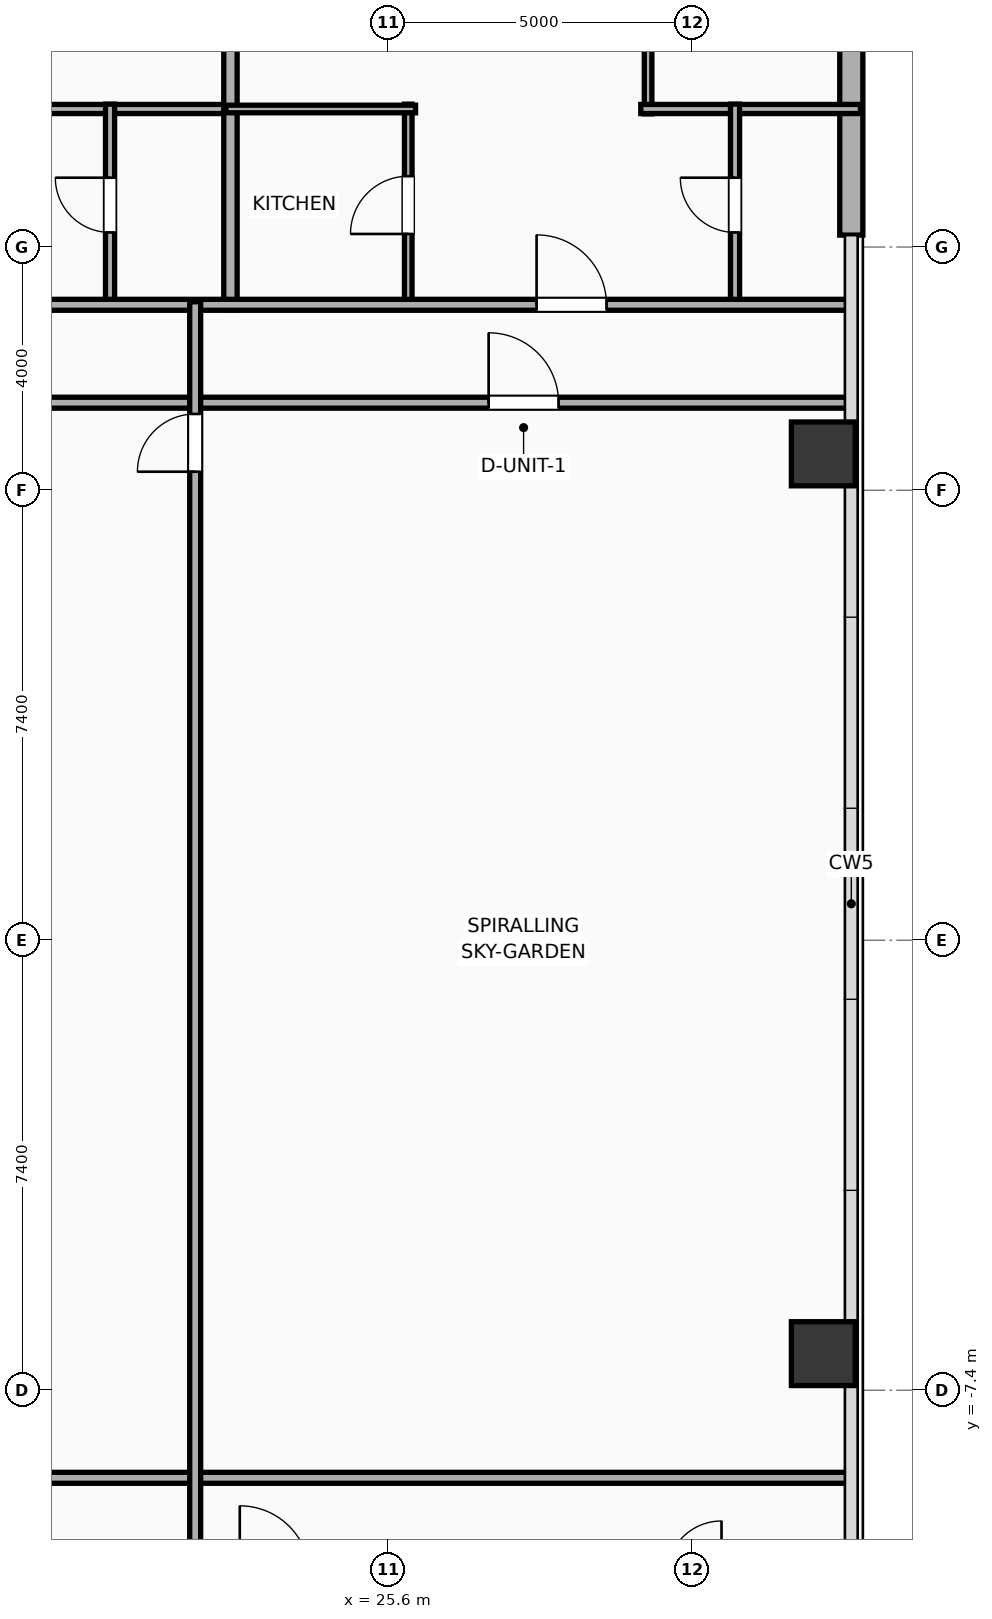
"""IFC4 building model, lengths in metres.
Left out: names, types, materials, properties, quantities, classifications, styles, units other than length and angle.
Written with IfcOpenShell. Run it as: python <this file> out.ifc"""

import sys

from ifc_helpers import new_model, si_unit, direction, frame, frame_2d, origin, origin_2d, place, context, subcontext, project, spatial, rectangle, hollow_rectangle, extrude, element, fill, save


model = new_model("IFC4")
c1 = context("Model", 3, precision=1e-05, world=origin(), true_north=direction((0.0, 1.0)))
c2 = subcontext(c1, "Body", "Model", "MODEL_VIEW")
j1 = project(units=[si_unit("LENGTHUNIT", "METRE"), si_unit("PLANEANGLEUNIT", "RADIAN")], contexts=[c1])
p1 = place(None, origin())
s1 = spatial("IfcSite", under=j1, at=p1, CompositionType="ELEMENT")
p2 = place(p1, origin())
s2 = spatial("IfcBuilding", under=s1, at=p2, CompositionType="ELEMENT")
p3 = place(p2, frame((0.0, 0.0, 93.6)))
s3 = spatial("IfcBuildingStorey", under=s2, at=p3, CompositionType="ELEMENT", Elevation=93.6)
for number, where, z_axis, x_axis in (
    (1, (32.75, -6.798, 0.0), (0.0, 0.0, 1.0), (1.0, 0.0, 0.0)),
    (2, (32.75, 7.998, 0.0), (0.0, 0.0, 1.0), (1.0, 0.0, 0.0)),
):
    element("IfcColumn", number, at=place(p3, frame(where, z_axis=z_axis, x_axis=x_axis)), inside=s3, PredefinedType="COLUMN", context=c2, shape_type="SweptSolid", body=[
        extrude(hollow_rectangle(XDim=1.05, YDim=1.05, WallThickness=0.036, at=origin_2d()), origin(), (0.0, 0.0, 1.0), 3.9),
    ])
p4 = place(p3, frame((33.21, 17.781, 0.0), z_axis=(0.0, 0.0, 1.0), x_axis=(0.0, -1.0, 0.0)))
e3 = element("IfcWall", 3, at=p4, inside=s3, PredefinedType="ELEMENTEDWALL", context=c2, shape_type="SweptSolid", body=[
    extrude(rectangle(XDim=6.185, YDim=0.38, at=frame_2d((3.093, 0.0))), origin(), (0.0, 0.0, 1.0), 3.65),
])
p5 = place(p3, frame((9.88, 8.84, 0.0), z_axis=(0.0, 0.0, 1.0), x_axis=(1.0, 0.0, 0.0)))
e4 = element("IfcWall", 4, at=p5, inside=s3, PredefinedType="PARTITIONING", context=c2, shape_type="SweptSolid", body=[
    extrude(rectangle(XDim=23.33, YDim=0.18, at=frame_2d((11.665, 0.0))), origin(), (0.0, 0.0, 1.0), 3.65),
])
p6 = place(p5, frame((17.366, 0.0, 0.0)))
e5 = element("IfcOpeningElement", 5, at=p6, cuts=e4, PredefinedType="OPENING", context=c2, shape_type="SweptSolid", body=[
    extrude(rectangle(XDim=1.15, YDim=2.05, at=frame_2d((0.575, 1.025))), frame((0.0, 0.1, 0.0), z_axis=(0.0, -1.0, 0.0), x_axis=(1.0, 0.0, 0.0)), (0.0, 0.0, 1.0), 0.2),
])
p7 = place(p3, frame((9.88, -8.84, 0.0), z_axis=(0.0, 0.0, 1.0), x_axis=(1.0, 0.0, 0.0)))
e6 = element("IfcWall", 6, at=p7, inside=s3, PredefinedType="PARTITIONING", context=c2, shape_type="SweptSolid", body=[
    extrude(rectangle(XDim=23.33, YDim=0.18, at=frame_2d((11.665, 0.0))), origin(), (0.0, 0.0, 1.0), 3.65),
])
p8 = place(p3, frame((19.47, 13.67, 0.0), z_axis=(0.0, 0.0, 1.0), x_axis=(1.0, 0.0, 0.0)))
e7 = element("IfcWall", 7, at=p8, inside=s3, PredefinedType="PLUMBINGWALL", context=c2, shape_type="SweptSolid", body=[
    extrude(rectangle(XDim=3.605, YDim=0.15, at=frame_2d((1.802, 0.0))), origin(), (0.0, 0.0, 1.0), 3.65),
])
p9 = place(p3, frame((21.02, 10.43, 0.0), z_axis=(0.0, 0.0, 1.0), x_axis=(0.0, 1.0, 0.0)))
e8 = element("IfcWall", 8, at=p9, inside=s3, PredefinedType="PLUMBINGWALL", context=c2, shape_type="SweptSolid", body=[
    extrude(rectangle(XDim=3.32, YDim=0.15, at=frame_2d((1.66, 0.0))), origin(), (0.0, 0.0, 1.0), 3.65),
])
p10 = place(p9, frame((1.21, 0.0, 0.0)))
e9 = element("IfcOpeningElement", 9, at=p10, cuts=e8, PredefinedType="OPENING", context=c2, shape_type="SweptSolid", body=[
    extrude(rectangle(XDim=0.9, YDim=2.05, at=frame_2d((0.45, 1.025))), frame((0.0, 0.085, 0.0), z_axis=(0.0, -1.0, 0.0), x_axis=(1.0, 0.0, 0.0)), (0.0, 0.0, 1.0), 0.17),
])
p11 = place(p3, frame((23.0, 10.37, 0.0), z_axis=(0.0, 0.0, 1.0), x_axis=(0.0, 1.0, 0.0)))
e10 = element("IfcWall", 10, at=p11, inside=s3, PredefinedType="PARTITIONING", context=c2, shape_type="SweptSolid", body=[
    extrude(rectangle(XDim=11.24, YDim=0.22, at=frame_2d((5.62, 0.0))), origin(), (0.0, 0.0, 1.0), 3.65),
])
p12 = place(p3, frame((29.868, 13.59, 0.0), z_axis=(0.0, 0.0, 1.0), x_axis=(0.0, 1.0, 0.0)))
e11 = element("IfcWall", 11, at=p12, inside=s3, PredefinedType="PARTITIONING", context=c2, shape_type="SweptSolid", body=[
    extrude(rectangle(XDim=8.076, YDim=0.125, at=frame_2d((4.038, 0.0))), origin(), (0.0, 0.0, 1.0), 3.65),
])
p13 = place(p12, frame((1.488, 0.0, 0.0)))
e12 = element("IfcOpeningElement", 12, at=p13, cuts=e11, PredefinedType="OPENING", context=c2, shape_type="SweptSolid", body=[
    extrude(rectangle(XDim=0.9, YDim=2.05, at=frame_2d((0.45, 1.025))), frame((0.0, 0.073, 0.0), z_axis=(0.0, -1.0, 0.0), x_axis=(1.0, 0.0, 0.0)), (0.0, 0.0, 1.0), 0.145),
])
p14 = place(p3, frame((29.748, 13.67, 0.0), z_axis=(0.0, 0.0, 1.0), x_axis=(1.0, 0.0, 0.0)))
e13 = element("IfcWall", 13, at=p14, inside=s3, PredefinedType="PLUMBINGWALL", context=c2, shape_type="SweptSolid", body=[
    extrude(rectangle(XDim=3.612, YDim=0.15, at=frame_2d((1.806, 0.0))), origin(), (0.0, 0.0, 1.0), 3.65),
])
p15 = place(p3, frame((25.924, 10.43, 0.0), z_axis=(0.0, 0.0, 1.0), x_axis=(0.0, 1.0, 0.0)))
e14 = element("IfcWall", 14, at=p15, inside=s3, PredefinedType="PARTITIONING", context=c2, shape_type="SweptSolid", body=[
    extrude(rectangle(XDim=3.32, YDim=0.125, at=frame_2d((1.66, 0.0))), origin(), (0.0, 0.0, 1.0), 3.65),
])
p16 = place(p15, frame((1.185, 0.0, 0.0)))
e15 = element("IfcOpeningElement", 15, at=p16, cuts=e14, PredefinedType="OPENING", context=c2, shape_type="SweptSolid", body=[
    extrude(rectangle(XDim=0.95, YDim=2.05, at=frame_2d((0.475, 1.025))), frame((0.0, 0.073, 0.0), z_axis=(0.0, -1.0, 0.0), x_axis=(1.0, 0.0, 0.0)), (0.0, 0.0, 1.0), 0.145),
])
p17 = place(p3, frame((22.925, 13.67, 0.0), z_axis=(0.0, 0.0, 1.0), x_axis=(1.0, 0.0, 0.0)))
e16 = element("IfcWall", 16, at=p17, inside=s3, PredefinedType="PARTITIONING", context=c2, shape_type="SweptSolid", body=[
    extrude(rectangle(XDim=3.119, YDim=0.125, at=frame_2d((1.56, 0.0))), origin(), (0.0, 0.0, 1.0), 3.65),
])
p18 = place(p3, frame((31.298, 10.43, 0.0), z_axis=(0.0, 0.0, 1.0), x_axis=(0.0, 1.0, 0.0)))
e17 = element("IfcWall", 17, at=p18, inside=s3, PredefinedType="PLUMBINGWALL", context=c2, shape_type="SweptSolid", body=[
    extrude(rectangle(XDim=3.32, YDim=0.15, at=frame_2d((1.66, 0.0))), origin(), (0.0, 0.0, 1.0), 3.65),
])
p19 = place(p18, frame((1.21, 0.0, 0.0)))
e18 = element("IfcOpeningElement", 18, at=p19, cuts=e17, PredefinedType="OPENING", context=c2, shape_type="SweptSolid", body=[
    extrude(rectangle(XDim=0.9, YDim=2.05, at=frame_2d((0.45, 1.025))), frame((0.0, 0.085, 0.0), z_axis=(0.0, -1.0, 0.0), x_axis=(1.0, 0.0, 0.0)), (0.0, 0.0, 1.0), 0.17),
])
p20 = place(p3, frame((-29.21, 10.45, 0.0), z_axis=(0.0, 0.0, 1.0), x_axis=(1.0, 0.0, 0.0)))
e19 = element("IfcWall", 19, at=p20, inside=s3, PredefinedType="PARTITIONING", context=c2, shape_type="SweptSolid", body=[
    extrude(rectangle(XDim=62.42, YDim=0.18, at=frame_2d((31.21, 0.0))), origin(), (0.0, 0.0, 1.0), 3.65),
])
p21 = place(p20, frame((2.534, 0.0, 0.0)))
e20 = element("IfcOpeningElement", 20, at=p21, cuts=e19, PredefinedType="OPENING", context=c2, shape_type="SweptSolid", body=[
    extrude(rectangle(XDim=0.9, YDim=2.05, at=frame_2d((0.45, 1.025))), frame((0.0, 0.1, 0.0), z_axis=(0.0, -1.0, 0.0), x_axis=(1.0, 0.0, 0.0)), (0.0, 0.0, 1.0), 0.2),
])
p22 = place(p20, frame((9.056, 0.0, 0.0)))
e21 = element("IfcOpeningElement", 21, at=p22, cuts=e19, PredefinedType="OPENING", context=c2, shape_type="SweptSolid", body=[
    extrude(rectangle(XDim=1.15, YDim=2.05, at=frame_2d((0.575, 1.025))), frame((0.0, 0.1, 0.0), z_axis=(0.0, -1.0, 0.0), x_axis=(1.0, 0.0, 0.0)), (0.0, 0.0, 1.0), 0.2),
])
p23 = place(p20, frame((16.303, 0.0, 0.0)))
e22 = element("IfcOpeningElement", 22, at=p23, cuts=e19, PredefinedType="OPENING", context=c2, shape_type="SweptSolid", body=[
    extrude(rectangle(XDim=1.15, YDim=2.05, at=frame_2d((0.575, 1.025))), frame((0.0, 0.1, 0.0), z_axis=(0.0, -1.0, 0.0), x_axis=(1.0, 0.0, 0.0)), (0.0, 0.0, 1.0), 0.2),
])
p24 = place(p20, frame((26.565, 0.0, 0.0)))
e23 = element("IfcOpeningElement", 23, at=p24, cuts=e19, PredefinedType="OPENING", context=c2, shape_type="SweptSolid", body=[
    extrude(rectangle(XDim=1.15, YDim=2.05, at=frame_2d((0.575, 1.025))), frame((0.0, 0.1, 0.0), z_axis=(0.0, -1.0, 0.0), x_axis=(1.0, 0.0, 0.0)), (0.0, 0.0, 1.0), 0.2),
])
p25 = place(p20, frame((36.677, 0.0, 0.0)))
e24 = element("IfcOpeningElement", 24, at=p25, cuts=e19, PredefinedType="OPENING", context=c2, shape_type="SweptSolid", body=[
    extrude(rectangle(XDim=1.15, YDim=2.05, at=frame_2d((0.575, 1.025))), frame((0.0, 0.1, 0.0), z_axis=(0.0, -1.0, 0.0), x_axis=(1.0, 0.0, 0.0)), (0.0, 0.0, 1.0), 0.2),
])
p26 = place(p20, frame((46.939, 0.0, 0.0)))
e25 = element("IfcOpeningElement", 25, at=p26, cuts=e19, PredefinedType="OPENING", context=c2, shape_type="SweptSolid", body=[
    extrude(rectangle(XDim=1.15, YDim=2.05, at=frame_2d((0.575, 1.025))), frame((0.0, 0.1, 0.0), z_axis=(0.0, -1.0, 0.0), x_axis=(1.0, 0.0, 0.0)), (0.0, 0.0, 1.0), 0.2),
])
p27 = place(p20, frame((57.245, 0.0, 0.0)))
e26 = element("IfcOpeningElement", 26, at=p27, cuts=e19, PredefinedType="OPENING", context=c2, shape_type="SweptSolid", body=[
    extrude(rectangle(XDim=1.15, YDim=2.05, at=frame_2d((0.575, 1.025))), frame((0.0, 0.1, 0.0), z_axis=(0.0, -1.0, 0.0), x_axis=(1.0, 0.0, 0.0)), (0.0, 0.0, 1.0), 0.2),
])
p28 = place(p3, frame((22.42, -10.5, 0.0), z_axis=(0.0, 0.0, 1.0), x_axis=(0.0, 1.0, 0.0)))
e27 = element("IfcWall", 27, at=p28, inside=s3, PredefinedType="PARTITIONING", context=c2, shape_type="SweptSolid", body=[
    extrude(rectangle(XDim=21.0, YDim=0.18, at=frame_2d((10.5, 0.0))), origin(), (0.0, 0.0, 1.0), 3.65),
])
p29 = place(p28, frame((18.205, 0.0, 0.0)))
e28 = element("IfcOpeningElement", 28, at=p29, cuts=e27, PredefinedType="OPENING", context=c2, shape_type="SweptSolid", body=[
    extrude(rectangle(XDim=0.95, YDim=2.05, at=frame_2d((0.475, 1.025))), frame((0.0, 0.1, 0.0), z_axis=(0.0, -1.0, 0.0), x_axis=(1.0, 0.0, 0.0)), (0.0, 0.0, 1.0), 0.2),
])
p30 = place(p6, origin())
e29 = element("IfcDoor", 29, at=p30, inside=s3, OperationType="SINGLE_SWING_LEFT", PredefinedType="DOOR", context=c2, shape_type="SweptSolid", body=[
    extrude(rectangle(XDim=1.15, YDim=2.05, at=frame_2d((0.575, 1.025))), frame((0.0, 0.025, 0.0), z_axis=(0.0, -1.0, 0.0), x_axis=(1.0, 0.0, 0.0)), (0.0, 0.0, 1.0), 0.05),
])
fill(e5, e29)
p31 = place(p10, origin())
e30 = element("IfcDoor", 30, at=p31, inside=s3, OperationType="SINGLE_SWING_RIGHT", PredefinedType="DOOR", context=c2, shape_type="SweptSolid", body=[
    extrude(rectangle(XDim=0.9, YDim=2.05, at=frame_2d((0.45, 1.025))), frame((0.0, 0.025, 0.0), z_axis=(0.0, -1.0, 0.0), x_axis=(1.0, 0.0, 0.0)), (0.0, 0.0, 1.0), 0.05),
])
fill(e9, e30)
p32 = place(p16, origin())
e31 = element("IfcDoor", 31, at=p32, inside=s3, OperationType="SINGLE_SWING_LEFT", PredefinedType="DOOR", context=c2, shape_type="SweptSolid", body=[
    extrude(rectangle(XDim=0.95, YDim=2.05, at=frame_2d((0.475, 1.025))), frame((0.0, 0.025, 0.0), z_axis=(0.0, -1.0, 0.0), x_axis=(1.0, 0.0, 0.0)), (0.0, 0.0, 1.0), 0.05),
])
fill(e15, e31)
p33 = place(p19, origin())
e32 = element("IfcDoor", 32, at=p33, inside=s3, OperationType="SINGLE_SWING_RIGHT", PredefinedType="DOOR", context=c2, shape_type="SweptSolid", body=[
    extrude(rectangle(XDim=0.9, YDim=2.05, at=frame_2d((0.45, 1.025))), frame((0.0, 0.025, 0.0), z_axis=(0.0, -1.0, 0.0), x_axis=(1.0, 0.0, 0.0)), (0.0, 0.0, 1.0), 0.05),
])
fill(e18, e32)
p34 = place(p27, origin())
e33 = element("IfcDoor", 33, at=p34, inside=s3, OperationType="SINGLE_SWING_LEFT", PredefinedType="DOOR", context=c2, shape_type="SweptSolid", body=[
    extrude(rectangle(XDim=1.15, YDim=2.05, at=frame_2d((0.575, 1.025))), frame((0.0, 0.025, 0.0), z_axis=(0.0, -1.0, 0.0), x_axis=(1.0, 0.0, 0.0)), (0.0, 0.0, 1.0), 0.05),
])
fill(e26, e33)
p35 = place(p29, origin())
e34 = element("IfcDoor", 34, at=p35, inside=s3, OperationType="SINGLE_SWING_LEFT", PredefinedType="DOOR", context=c2, shape_type="SweptSolid", body=[
    extrude(rectangle(XDim=0.95, YDim=2.05, at=frame_2d((0.475, 1.025))), frame((0.0, 0.025, 0.0), z_axis=(0.0, -1.0, 0.0), x_axis=(1.0, 0.0, 0.0)), (0.0, 0.0, 1.0), 0.05),
])
fill(e28, e34)
save(model, sys.argv[1])
